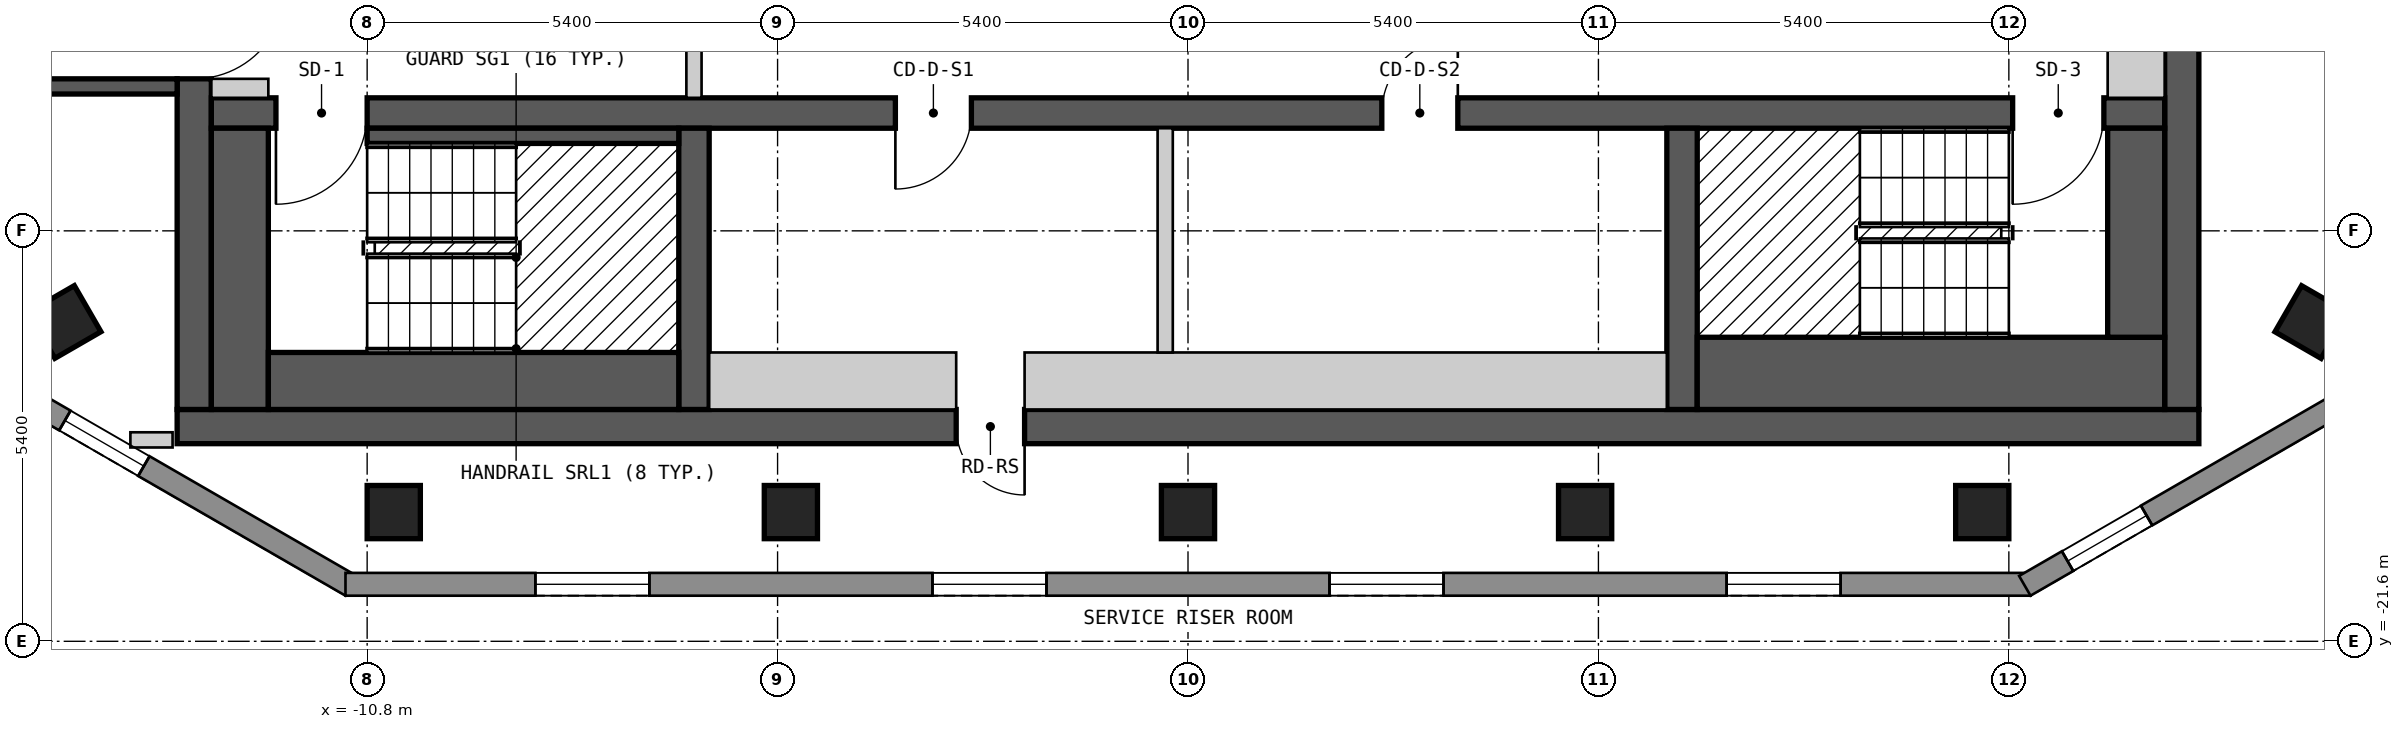
"""IFC4 building model, lengths in metres.
Left out: names, types, materials, properties, quantities, classifications, styles, units other than length and angle.
Written with IfcOpenShell. Run it as: python <this file> out.ifc"""

import sys

from ifc_helpers import new_model, si_unit, direction, frame, frame_2d, origin, origin_2d, place, context, subcontext, project, spatial, polyline, rectangle, outline, extrude, element, fill, save


model = new_model("IFC4")
c1 = context("Model", 3, precision=1e-05, world=origin(), true_north=direction((0.0, 1.0)))
c2 = subcontext(c1, "Body", "Model", "MODEL_VIEW")
j1 = project(units=[si_unit("LENGTHUNIT", "METRE"), si_unit("PLANEANGLEUNIT", "RADIAN")], contexts=[c1])
p1 = place(None, origin())
s1 = spatial("IfcSite", under=j1, at=p1, CompositionType="ELEMENT")
p2 = place(p1, origin())
s2 = spatial("IfcBuilding", under=s1, at=p2, CompositionType="ELEMENT")
p3 = place(p2, frame((0.0, 0.0, 211.8)))
s3 = spatial("IfcBuildingStorey", under=s2, at=p3, CompositionType="ELEMENT", Elevation=211.8)
for number, where, z_axis, x_axis in (
    (1, (-14.781, -17.399, 0.0), (0.0, 0.0, 1.0), (0.5, -0.866, 0.0)),
    (2, (-10.45, -19.9, 0.0), (0.0, 0.0, 1.0), (1.0, 0.0, 0.0)),
    (3, (-5.225, -19.9, 0.0), (0.0, 0.0, 1.0), (1.0, 0.0, 0.0)),
    (4, (0.0, -19.9, 0.0), (0.0, 0.0, 1.0), (1.0, 0.0, 0.0)),
    (5, (5.225, -19.9, 0.0), (0.0, 0.0, 1.0), (1.0, 0.0, 0.0)),
    (6, (10.45, -19.9, 0.0), (0.0, 0.0, 1.0), (1.0, 0.0, 0.0)),
    (7, (14.78, -17.4, 0.0), (0.0, 0.0, 1.0), (0.5, 0.866, 0.0)),
):
    element("IfcColumn", number, at=place(p3, frame(where, z_axis=z_axis, x_axis=x_axis)), inside=s3, PredefinedType="COLUMN", context=c2, shape_type="SweptSolid", body=[
        extrude(rectangle(XDim=0.7, YDim=0.7, at=origin_2d()), origin(), (0.0, 0.0, 1.0), 3.0),
    ])
p4 = place(p3, frame((-13.3, -18.775, 0.0), z_axis=(0.0, 0.0, 1.0), x_axis=(1.0, 0.0, 0.0)))
e8 = element("IfcWall", 8, at=p4, inside=s3, PredefinedType="SHEAR", context=c2, shape_type="SweptSolid", body=[
    extrude(rectangle(XDim=26.6, YDim=0.45, at=frame_2d((13.3, 0.0))), origin(), (0.0, 0.0, 1.0), 2.7),
])
p5 = place(p4, frame((10.25, 0.0, 0.0)))
e9 = element("IfcOpeningElement", 9, at=p5, cuts=e8, PredefinedType="OPENING", context=c2, shape_type="SweptSolid", body=[
    extrude(rectangle(XDim=0.9, YDim=2.1, at=frame_2d((0.45, 1.05))), frame((0.0, 0.235, 0.0), z_axis=(0.0, -1.0, 0.0), x_axis=(1.0, 0.0, 0.0)), (0.0, 0.0, 1.0), 0.47),
])
p6 = place(p3, frame((-13.075, -18.55, 0.0), z_axis=(0.0, 0.0, 1.0), x_axis=(0.0, 1.0, 0.0)))
e10 = element("IfcWall", 10, at=p6, inside=s3, PredefinedType="SHEAR", context=c2, shape_type="SweptSolid", body=[
    extrude(rectangle(XDim=13.1, YDim=0.45, at=frame_2d((6.55, 0.0))), origin(), (0.0, 0.0, 1.0), 2.7),
])
p7 = place(p6, frame((4.35, 0.0, 0.0)))
e11 = element("IfcOpeningElement", 11, at=p7, cuts=e10, PredefinedType="OPENING", context=c2, shape_type="SweptSolid", body=[
    extrude(rectangle(XDim=1.2, YDim=2.1, at=frame_2d((0.6, 1.05))), frame((0.0, 0.235, 0.0), z_axis=(0.0, -1.0, 0.0), x_axis=(1.0, 0.0, 0.0)), (0.0, 0.0, 1.0), 0.47),
])
p8 = place(p3, frame((13.075, -18.55, 0.0), z_axis=(0.0, 0.0, 1.0), x_axis=(0.0, 1.0, 0.0)))
e12 = element("IfcWall", 12, at=p8, inside=s3, PredefinedType="SHEAR", context=c2, shape_type="SweptSolid", body=[
    extrude(rectangle(XDim=13.1, YDim=0.45, at=frame_2d((6.55, 0.0))), origin(), (0.0, 0.0, 1.0), 2.7),
])
p9 = place(p3, frame((-12.85, -14.65, 0.0), z_axis=(0.0, 0.0, 1.0), x_axis=(1.0, 0.0, 0.0)))
e13 = element("IfcWall", 13, at=p9, inside=s3, PredefinedType="SHEAR", context=c2, shape_type="SweptSolid", body=[
    extrude(rectangle(XDim=25.7, YDim=0.4, at=frame_2d((12.85, 0.0))), origin(), (0.0, 0.0, 1.0), 2.7),
])
p10 = place(p9, frame((2.05, 0.0, 0.0), z_axis=(0.0, 0.0, 1.0), x_axis=(-1.0, 0.0, 0.0)))
e14 = element("IfcOpeningElement", 14, at=p10, cuts=e13, PredefinedType="OPENING", context=c2, shape_type="SweptSolid", body=[
    extrude(rectangle(XDim=1.2, YDim=2.1, at=frame_2d((0.6, 1.05))), frame((0.0, 0.21, 0.0), z_axis=(0.0, -1.0, 0.0), x_axis=(1.0, 0.0, 0.0)), (0.0, 0.0, 1.0), 0.42),
])
p11 = place(p9, frame((24.9, 0.0, 0.0), z_axis=(0.0, 0.0, 1.0), x_axis=(-1.0, 0.0, 0.0)))
e15 = element("IfcOpeningElement", 15, at=p11, cuts=e13, PredefinedType="OPENING", context=c2, shape_type="SweptSolid", body=[
    extrude(rectangle(XDim=1.2, YDim=2.1, at=frame_2d((0.6, 1.05))), frame((0.0, 0.21, 0.0), z_axis=(0.0, -1.0, 0.0), x_axis=(1.0, 0.0, 0.0)), (0.0, 0.0, 1.0), 0.42),
])
p12 = place(p9, frame((10.0, 0.0, 0.0), z_axis=(0.0, 0.0, 1.0), x_axis=(-1.0, 0.0, 0.0)))
e16 = element("IfcOpeningElement", 16, at=p12, cuts=e13, PredefinedType="OPENING", context=c2, shape_type="SweptSolid", body=[
    extrude(rectangle(XDim=1.0, YDim=2.1, at=frame_2d((0.5, 1.05))), frame((0.0, 0.21, 0.0), z_axis=(0.0, -1.0, 0.0), x_axis=(1.0, 0.0, 0.0)), (0.0, 0.0, 1.0), 0.42),
])
p13 = place(p9, frame((16.4, 0.0, 0.0), z_axis=(0.0, 0.0, 1.0), x_axis=(-1.0, 0.0, 0.0)))
e17 = element("IfcOpeningElement", 17, at=p13, cuts=e13, PredefinedType="OPENING", context=c2, shape_type="SweptSolid", body=[
    extrude(rectangle(XDim=1.0, YDim=2.1, at=frame_2d((0.5, 1.05))), frame((0.0, 0.21, 0.0), z_axis=(0.0, -1.0, 0.0), x_axis=(1.0, 0.0, 0.0)), (0.0, 0.0, 1.0), 0.42),
])
for number, where, z_axis, x_axis in (
    (18, (-6.5, -18.55, 0.0), (0.0, 0.0, 1.0), (0.0, 1.0, 0.0)),
    (19, (6.5, -18.55, 0.0), (0.0, 0.0, 1.0), (0.0, 1.0, 0.0)),
):
    element("IfcWall", number, at=place(p3, frame(where, z_axis=z_axis, x_axis=x_axis)), inside=s3, PredefinedType="SHEAR", context=c2, shape_type="SweptSolid", body=[
        extrude(rectangle(XDim=3.7, YDim=0.4, at=frame_2d((1.85, 0.0))), origin(), (0.0, 0.0, 1.0), 2.7),
    ])
p14 = place(p3, frame((-15.34, -18.37, 0.0), z_axis=(0.0, 0.0, 1.0), x_axis=(0.866022959057, -0.500004234368, 0.0)))
e20 = element("IfcWall", 20, at=p14, inside=s3, PredefinedType="SOLIDWALL", context=c2, shape_type="SweptSolid", body=[
    extrude(outline(polyline([(0.0, -0.15), (5.0, -0.15), (4.92, 0.15), (0.08, 0.15), (0.0, -0.15)])), origin(), (0.0, 0.0, 1.0), 2.7),
])
p15 = place(p14, frame((0.65, 0.0, 0.15)))
e21 = element("IfcOpeningElement", 21, at=p15, cuts=e20, PredefinedType="OPENING", context=c2, shape_type="SweptSolid", body=[
    extrude(rectangle(XDim=1.2, YDim=2.1, at=frame_2d((0.6, 1.05))), frame((0.0, 0.16, 0.0), z_axis=(0.0, -1.0, 0.0), x_axis=(1.0, 0.0, 0.0)), (0.0, 0.0, 1.0), 0.32),
])
p16 = place(p3, frame((-11.085, -20.85, 0.0), z_axis=(0.0, 0.0, 1.0), x_axis=(1.0, 0.0, 0.0)))
e22 = element("IfcWall", 22, at=p16, inside=s3, PredefinedType="SOLIDWALL", context=c2, shape_type="SweptSolid", body=[
    extrude(outline(polyline([(0.0, -0.15), (22.17, -0.15), (22.09, 0.15), (0.08, 0.15), (0.0, -0.15)])), origin(), (0.0, 0.0, 1.0), 2.7),
])
p17 = place(p16, frame((2.498, 0.0, 0.15)))
e23 = element("IfcOpeningElement", 23, at=p17, cuts=e22, PredefinedType="OPENING", context=c2, shape_type="SweptSolid", body=[
    extrude(rectangle(XDim=1.5, YDim=2.1, at=frame_2d((0.75, 1.05))), frame((0.0, 0.16, 0.0), z_axis=(0.0, -1.0, 0.0), x_axis=(1.0, 0.0, 0.0)), (0.0, 0.0, 1.0), 0.32),
])
p18 = place(p16, frame((7.723, 0.0, 0.15)))
e24 = element("IfcOpeningElement", 24, at=p18, cuts=e22, PredefinedType="OPENING", context=c2, shape_type="SweptSolid", body=[
    extrude(rectangle(XDim=1.5, YDim=2.1, at=frame_2d((0.75, 1.05))), frame((0.0, 0.16, 0.0), z_axis=(0.0, -1.0, 0.0), x_axis=(1.0, 0.0, 0.0)), (0.0, 0.0, 1.0), 0.32),
])
p19 = place(p16, frame((12.947, 0.0, 0.15)))
e25 = element("IfcOpeningElement", 25, at=p19, cuts=e22, PredefinedType="OPENING", context=c2, shape_type="SweptSolid", body=[
    extrude(rectangle(XDim=1.5, YDim=2.1, at=frame_2d((0.75, 1.05))), frame((0.0, 0.16, 0.0), z_axis=(0.0, -1.0, 0.0), x_axis=(1.0, 0.0, 0.0)), (0.0, 0.0, 1.0), 0.32),
])
p20 = place(p16, frame((18.172, 0.0, 0.15)))
e26 = element("IfcOpeningElement", 26, at=p20, cuts=e22, PredefinedType="OPENING", context=c2, shape_type="SweptSolid", body=[
    extrude(rectangle(XDim=1.5, YDim=2.1, at=frame_2d((0.75, 1.05))), frame((0.0, 0.16, 0.0), z_axis=(0.0, -1.0, 0.0), x_axis=(1.0, 0.0, 0.0)), (0.0, 0.0, 1.0), 0.32),
])
p21 = place(p3, frame((11.01, -20.87, 0.0), z_axis=(0.0, 0.0, 1.0), x_axis=(0.866022959057, 0.500004234368, 0.0)))
e27 = element("IfcWall", 27, at=p21, inside=s3, PredefinedType="SOLIDWALL", context=c2, shape_type="SweptSolid", body=[
    extrude(outline(polyline([(0.0, -0.15), (5.0, -0.15), (4.92, 0.15), (0.08, 0.15), (0.0, -0.15)])), origin(), (0.0, 0.0, 1.0), 2.7),
])
p22 = place(p21, frame((0.65, 0.0, 0.15)))
e28 = element("IfcOpeningElement", 28, at=p22, cuts=e27, PredefinedType="OPENING", context=c2, shape_type="SweptSolid", body=[
    extrude(rectangle(XDim=1.2, YDim=2.1, at=frame_2d((0.6, 1.05))), frame((0.0, 0.16, 0.0), z_axis=(0.0, -1.0, 0.0), x_axis=(1.0, 0.0, 0.0)), (0.0, 0.0, 1.0), 0.32),
])
p23 = place(p3, frame((-13.915, -18.95, 0.0), z_axis=(0.0, 0.0, 1.0), x_axis=(1.0, 0.0, 0.0)))
e29 = element("IfcWall", 29, at=p23, inside=s3, PredefinedType="PARTITIONING", context=c2, shape_type="SweptSolid", body=[
    extrude(rectangle(XDim=0.555, YDim=0.2, at=frame_2d((0.277, 0.0))), origin(), (0.0, 0.0, 1.0), 2.7),
])
p24 = place(p3, frame((-16.05, -14.3, 0.0), z_axis=(0.0, 0.0, 1.0), x_axis=(1.0, 0.0, 0.0)))
e30 = element("IfcWall", 30, at=p24, inside=s3, PredefinedType="SOLIDWALL", context=c2, shape_type="SweptSolid", body=[
    extrude(rectangle(XDim=2.75, YDim=0.2, at=frame_2d((1.375, 0.0))), origin(), (0.0, 0.0, 1.0), 2.7),
])
p25 = place(p3, frame((-12.475, -18.55, 0.0), z_axis=(0.0, 0.0, 1.0), x_axis=(0.0, 1.0, 0.0)))
e31 = element("IfcWall", 31, at=p25, inside=s3, PredefinedType="SOLIDWALL", context=c2, shape_type="SweptSolid", body=[
    extrude(rectangle(XDim=3.7, YDim=0.75, at=frame_2d((1.85, 0.0))), origin(), (0.0, 0.0, 1.0), 2.7),
])
p26 = place(p3, frame((-12.85, -14.325, 0.0), z_axis=(0.0, 0.0, 1.0), x_axis=(1.0, 0.0, 0.0)))
e32 = element("IfcWall", 32, at=p26, inside=s3, PredefinedType="PARTITIONING", context=c2, shape_type="SweptSolid", body=[
    extrude(rectangle(XDim=0.75, YDim=0.25, at=frame_2d((0.375, 0.0))), origin(), (0.0, 0.0, 1.0), 2.7),
])
p27 = place(p3, frame((-12.1, -18.175, 0.0), z_axis=(0.0, 0.0, 1.0), x_axis=(1.0, 0.0, 0.0)))
e33 = element("IfcWall", 33, at=p27, inside=s3, PredefinedType="SOLIDWALL", context=c2, shape_type="SweptSolid", body=[
    extrude(rectangle(XDim=5.4, YDim=0.75, at=frame_2d((2.7, 0.0))), origin(), (0.0, 0.0, 1.0), 2.7),
])
p28 = place(p3, frame((-10.8, -14.95, 0.0), z_axis=(0.0, 0.0, 1.0), x_axis=(1.0, 0.0, 0.0)))
e34 = element("IfcWall", 34, at=p28, inside=s3, PredefinedType="SOLIDWALL", context=c2, shape_type="SweptSolid", body=[
    extrude(rectangle(XDim=4.1, YDim=0.2, at=frame_2d((2.05, 0.0))), origin(), (0.0, 0.0, 1.0), 2.7),
])
p29 = place(p3, frame((-6.5, -14.45, 0.0), z_axis=(0.0, 0.0, 1.0), x_axis=(0.0, 1.0, 0.0)))
e35 = element("IfcWall", 35, at=p29, inside=s3, PredefinedType="PARTITIONING", context=c2, shape_type="SweptSolid", body=[
    extrude(rectangle(XDim=4.9, YDim=0.2, at=frame_2d((2.45, 0.0))), origin(), (0.0, 0.0, 1.0), 2.7),
])
p30 = place(p29, frame((3.15, 0.0, 0.0), z_axis=(0.0, 0.0, 1.0), x_axis=(-1.0, 0.0, 0.0)))
e36 = element("IfcOpeningElement", 36, at=p30, cuts=e35, PredefinedType="OPENING", context=c2, shape_type="SweptSolid", body=[
    extrude(rectangle(XDim=1.4, YDim=2.1, at=frame_2d((0.7, 1.05))), frame((0.0, 0.11, 0.0), z_axis=(0.0, -1.0, 0.0), x_axis=(1.0, 0.0, 0.0)), (0.0, 0.0, 1.0), 0.22),
])
p31 = place(p3, frame((-6.3, -18.175, 0.0), z_axis=(0.0, 0.0, 1.0), x_axis=(1.0, 0.0, 0.0)))
e37 = element("IfcWall", 37, at=p31, inside=s3, PredefinedType="PARTITIONING", context=c2, shape_type="SweptSolid", body=[
    extrude(rectangle(XDim=3.25, YDim=0.75, at=frame_2d((1.625, 0.0))), origin(), (0.0, 0.0, 1.0), 2.7),
])
p32 = place(p3, frame((-2.15, -18.175, 0.0), z_axis=(0.0, 0.0, 1.0), x_axis=(1.0, 0.0, 0.0)))
e38 = element("IfcWall", 38, at=p32, inside=s3, PredefinedType="PARTITIONING", context=c2, shape_type="SweptSolid", body=[
    extrude(rectangle(XDim=8.45, YDim=0.75, at=frame_2d((4.225, 0.0))), origin(), (0.0, 0.0, 1.0), 2.7),
])
p33 = place(p3, frame((-0.3, -17.8, 0.0), z_axis=(0.0, 0.0, 1.0), x_axis=(0.0, 1.0, 0.0)))
e39 = element("IfcWall", 39, at=p33, inside=s3, PredefinedType="PARTITIONING", context=c2, shape_type="SweptSolid", body=[
    extrude(rectangle(XDim=2.95, YDim=0.2, at=frame_2d((1.475, 0.0))), origin(), (0.0, 0.0, 1.0), 2.7),
])
p34 = place(p3, frame((6.7, -18.075, 0.0), z_axis=(0.0, 0.0, 1.0), x_axis=(1.0, 0.0, 0.0)))
e40 = element("IfcWall", 40, at=p34, inside=s3, PredefinedType="SOLIDWALL", context=c2, shape_type="SweptSolid", body=[
    extrude(rectangle(XDim=6.15, YDim=0.95, at=frame_2d((3.075, 0.0))), origin(), (0.0, 0.0, 1.0), 2.7),
])
p35 = place(p3, frame((12.475, -17.6, 0.0), z_axis=(0.0, 0.0, 1.0), x_axis=(0.0, 1.0, 0.0)))
e41 = element("IfcWall", 41, at=p35, inside=s3, PredefinedType="SOLIDWALL", context=c2, shape_type="SweptSolid", body=[
    extrude(rectangle(XDim=2.75, YDim=0.75, at=frame_2d((1.375, 0.0))), origin(), (0.0, 0.0, 1.0), 2.7),
])
p36 = place(p3, frame((12.475, -14.45, 0.0), z_axis=(0.0, 0.0, 1.0), x_axis=(0.0, 1.0, 0.0)))
e42 = element("IfcWall", 42, at=p36, inside=s3, PredefinedType="PARTITIONING", context=c2, shape_type="SweptSolid", body=[
    extrude(rectangle(XDim=8.25, YDim=0.75, at=frame_2d((4.125, 0.0))), origin(), (0.0, 0.0, 1.0), 2.7),
])
p37 = place(p15, origin())
e43 = element("IfcWindow", 43, at=p37, inside=s3, PartitioningType="SINGLE_PANEL", PredefinedType="WINDOW", context=c2, shape_type="SweptSolid", body=[
    extrude(rectangle(XDim=1.2, YDim=2.1, at=frame_2d((0.6, 1.05))), frame((0.0, 0.03, 0.0), z_axis=(0.0, -1.0, 0.0), x_axis=(1.0, 0.0, 0.0)), (0.0, 0.0, 1.0), 0.06),
])
fill(e21, e43)
p38 = place(p17, origin())
e44 = element("IfcWindow", 44, at=p38, inside=s3, PartitioningType="SINGLE_PANEL", PredefinedType="WINDOW", context=c2, shape_type="SweptSolid", body=[
    extrude(rectangle(XDim=1.5, YDim=2.1, at=frame_2d((0.75, 1.05))), frame((0.0, 0.03, 0.0), z_axis=(0.0, -1.0, 0.0), x_axis=(1.0, 0.0, 0.0)), (0.0, 0.0, 1.0), 0.06),
])
fill(e23, e44)
p39 = place(p18, origin())
e45 = element("IfcWindow", 45, at=p39, inside=s3, PartitioningType="SINGLE_PANEL", PredefinedType="WINDOW", context=c2, shape_type="SweptSolid", body=[
    extrude(rectangle(XDim=1.5, YDim=2.1, at=frame_2d((0.75, 1.05))), frame((0.0, 0.03, 0.0), z_axis=(0.0, -1.0, 0.0), x_axis=(1.0, 0.0, 0.0)), (0.0, 0.0, 1.0), 0.06),
])
fill(e24, e45)
p40 = place(p19, origin())
e46 = element("IfcWindow", 46, at=p40, inside=s3, PartitioningType="SINGLE_PANEL", PredefinedType="WINDOW", context=c2, shape_type="SweptSolid", body=[
    extrude(rectangle(XDim=1.5, YDim=2.1, at=frame_2d((0.75, 1.05))), frame((0.0, 0.03, 0.0), z_axis=(0.0, -1.0, 0.0), x_axis=(1.0, 0.0, 0.0)), (0.0, 0.0, 1.0), 0.06),
])
fill(e25, e46)
p41 = place(p20, origin())
e47 = element("IfcWindow", 47, at=p41, inside=s3, PartitioningType="SINGLE_PANEL", PredefinedType="WINDOW", context=c2, shape_type="SweptSolid", body=[
    extrude(rectangle(XDim=1.5, YDim=2.1, at=frame_2d((0.75, 1.05))), frame((0.0, 0.03, 0.0), z_axis=(0.0, -1.0, 0.0), x_axis=(1.0, 0.0, 0.0)), (0.0, 0.0, 1.0), 0.06),
])
fill(e26, e47)
p42 = place(p22, origin())
e48 = element("IfcWindow", 48, at=p42, inside=s3, PartitioningType="SINGLE_PANEL", PredefinedType="WINDOW", context=c2, shape_type="SweptSolid", body=[
    extrude(rectangle(XDim=1.2, YDim=2.1, at=frame_2d((0.6, 1.05))), frame((0.0, 0.03, 0.0), z_axis=(0.0, -1.0, 0.0), x_axis=(1.0, 0.0, 0.0)), (0.0, 0.0, 1.0), 0.06),
])
fill(e28, e48)
p43 = place(p10, origin())
e49 = element("IfcDoor", 49, at=p43, inside=s3, OperationType="SINGLE_SWING_RIGHT", PredefinedType="DOOR", context=c2, shape_type="SweptSolid", body=[
    extrude(rectangle(XDim=1.2, YDim=2.1, at=frame_2d((0.6, 1.05))), frame((0.0, 0.025, 0.0), z_axis=(0.0, -1.0, 0.0), x_axis=(1.0, 0.0, 0.0)), (0.0, 0.0, 1.0), 0.05),
])
fill(e14, e49)
p44 = place(p11, origin())
e50 = element("IfcDoor", 50, at=p44, inside=s3, OperationType="SINGLE_SWING_RIGHT", PredefinedType="DOOR", context=c2, shape_type="SweptSolid", body=[
    extrude(rectangle(XDim=1.2, YDim=2.1, at=frame_2d((0.6, 1.05))), frame((0.0, 0.025, 0.0), z_axis=(0.0, -1.0, 0.0), x_axis=(1.0, 0.0, 0.0)), (0.0, 0.0, 1.0), 0.05),
])
fill(e15, e50)
p45 = place(p7, origin())
e51 = element("IfcDoor", 51, at=p45, inside=s3, OperationType="SINGLE_SWING_RIGHT", PredefinedType="DOOR", context=c2, shape_type="SweptSolid", body=[
    extrude(rectangle(XDim=1.2, YDim=2.1, at=frame_2d((0.6, 1.05))), frame((0.0, 0.025, 0.0), z_axis=(0.0, -1.0, 0.0), x_axis=(1.0, 0.0, 0.0)), (0.0, 0.0, 1.0), 0.05),
])
fill(e11, e51)
p46 = place(p12, origin())
e52 = element("IfcDoor", 52, at=p46, inside=s3, OperationType="SINGLE_SWING_RIGHT", PredefinedType="DOOR", context=c2, shape_type="SweptSolid", body=[
    extrude(rectangle(XDim=1.0, YDim=2.1, at=frame_2d((0.5, 1.05))), frame((0.0, 0.025, 0.0), z_axis=(0.0, -1.0, 0.0), x_axis=(1.0, 0.0, 0.0)), (0.0, 0.0, 1.0), 0.05),
])
fill(e16, e52)
p47 = place(p13, origin())
e53 = element("IfcDoor", 53, at=p47, inside=s3, OperationType="SINGLE_SWING_LEFT", PredefinedType="DOOR", context=c2, shape_type="SweptSolid", body=[
    extrude(rectangle(XDim=1.0, YDim=2.1, at=frame_2d((0.5, 1.05))), frame((0.0, 0.025, 0.0), z_axis=(0.0, -1.0, 0.0), x_axis=(1.0, 0.0, 0.0)), (0.0, 0.0, 1.0), 0.05),
])
fill(e17, e53)
p48 = place(p5, origin())
e54 = element("IfcDoor", 54, at=p48, inside=s3, OperationType="SINGLE_SWING_RIGHT", PredefinedType="DOOR", context=c2, shape_type="SweptSolid", body=[
    extrude(rectangle(XDim=0.9, YDim=2.1, at=frame_2d((0.45, 1.05))), frame((0.0, 0.025, 0.0), z_axis=(0.0, -1.0, 0.0), x_axis=(1.0, 0.0, 0.0)), (0.0, 0.0, 1.0), 0.05),
])
fill(e9, e54)
save(model, sys.argv[1])
